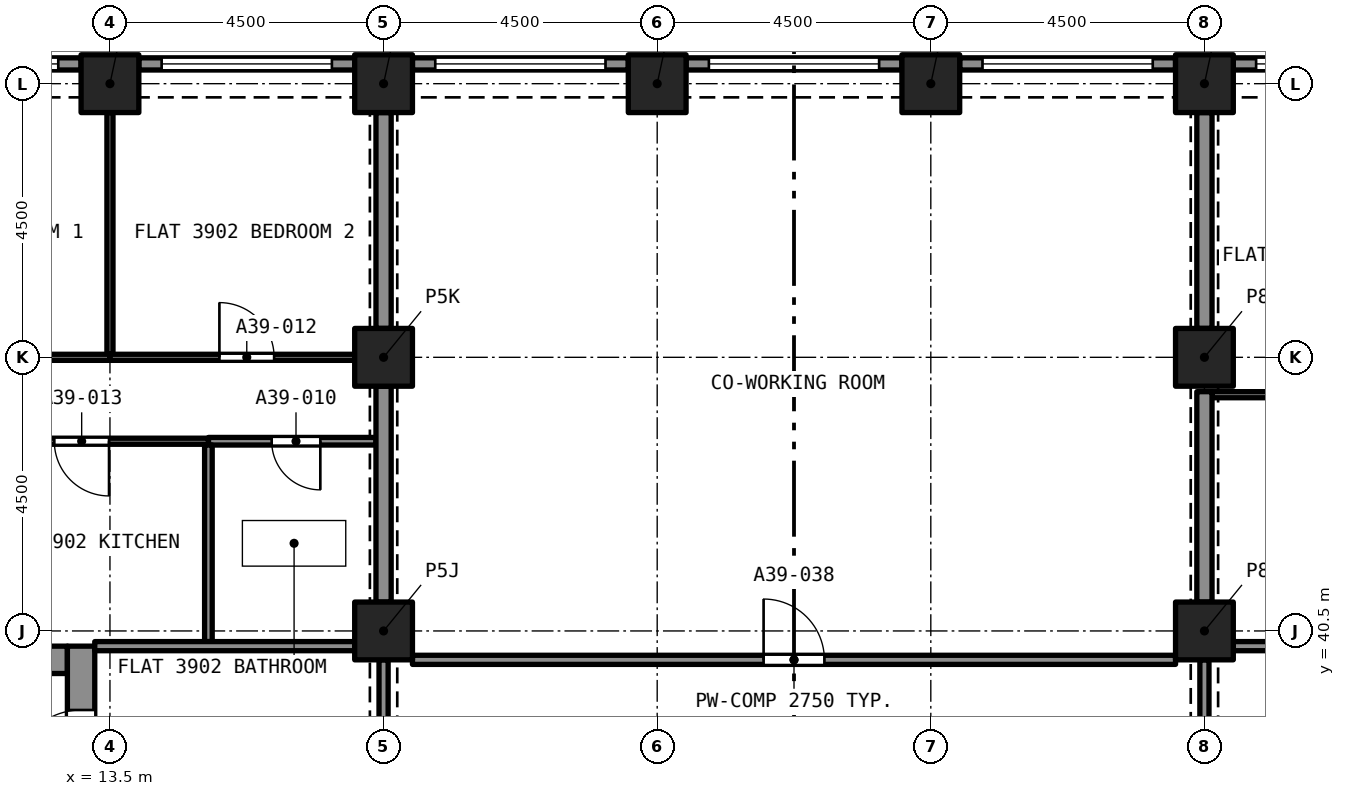
"""IFC4 building model, lengths in metres.
Left out: names, types, materials, properties, quantities, classifications, styles, units other than length and angle.
Written with IfcOpenShell. Run it as: python <this file> out.ifc"""

import sys

from ifc_helpers import new_model, si_unit, direction, frame, frame_2d, origin, origin_2d, place, context, subcontext, project, spatial, rectangle, extrude, element, fill, save


model = new_model("IFC4")
c1 = context("Model", 3, precision=1e-05, world=origin(), true_north=direction((0.0, 1.0)))
c2 = subcontext(c1, "Body", "Model", "MODEL_VIEW")
j1 = project(units=[si_unit("LENGTHUNIT", "METRE"), si_unit("PLANEANGLEUNIT", "RADIAN")], contexts=[c1])
p1 = place(None, origin())
s1 = spatial("IfcSite", under=j1, at=p1, CompositionType="ELEMENT")
p2 = place(p1, origin())
s2 = spatial("IfcBuilding", under=s1, at=p2, CompositionType="ELEMENT")
p3 = place(p2, frame((0.0, 0.0, 139.8)))
s3 = spatial("IfcBuildingStorey", under=s2, at=p3, CompositionType="ELEMENT", Elevation=139.8)
for number, where, z_axis, x_axis in (
    (1, (18.0, 40.5, 0.0), (0.0, 0.0, 1.0), (1.0, 0.0, 0.0)),
    (2, (31.5, 40.5, 0.0), (0.0, 0.0, 1.0), (1.0, 0.0, 0.0)),
    (3, (18.0, 45.0, 0.0), (0.0, 0.0, 1.0), (1.0, 0.0, 0.0)),
    (4, (31.5, 45.0, 0.0), (0.0, 0.0, 1.0), (1.0, 0.0, 0.0)),
    (5, (13.5, 49.5, 0.0), (0.0, 0.0, 1.0), (1.0, 0.0, 0.0)),
    (6, (18.0, 49.5, 0.0), (0.0, 0.0, 1.0), (1.0, 0.0, 0.0)),
    (7, (22.5, 49.5, 0.0), (0.0, 0.0, 1.0), (1.0, 0.0, 0.0)),
    (8, (27.0, 49.5, 0.0), (0.0, 0.0, 1.0), (1.0, 0.0, 0.0)),
    (9, (31.5, 49.5, 0.0), (0.0, 0.0, 1.0), (1.0, 0.0, 0.0)),
):
    element("IfcColumn", number, at=place(p3, frame(where, z_axis=z_axis, x_axis=x_axis)), inside=s3, PredefinedType="COLUMN", context=c2, shape_type="SweptSolid", body=[
        extrude(rectangle(XDim=0.95, YDim=0.95, at=origin_2d()), origin(), (0.0, 0.0, 1.0), 3.2),
    ])
p4 = place(p3, frame((5.2, 40.025, 0.0), z_axis=(0.0, 0.0, 1.0), x_axis=(1.0, 0.0, 0.0)))
e10 = element("IfcWall", 10, at=p4, inside=s3, PredefinedType="SOLIDWALL", context=c2, shape_type="SweptSolid", body=[
    extrude(rectangle(XDim=7.6, YDim=0.45, at=frame_2d((3.8, 0.0))), origin(), (0.0, 0.0, 1.0), 3.2),
])
p5 = place(p3, frame((13.025, 27.25, 0.0), z_axis=(0.0, 0.0, 1.0), x_axis=(0.0, 1.0, 0.0)))
e11 = element("IfcWall", 11, at=p5, inside=s3, PredefinedType="SOLIDWALL", context=c2, shape_type="SweptSolid", body=[
    extrude(rectangle(XDim=13.0, YDim=0.45, at=frame_2d((6.5, 0.0))), origin(), (0.0, 0.0, 1.0), 3.2),
])
p6 = place(p5, frame((10.85, 0.0, 0.0)))
e12 = element("IfcOpeningElement", 12, at=p6, cuts=e11, PredefinedType="OPENING", context=c2, shape_type="SweptSolid", body=[
    extrude(rectangle(XDim=1.1, YDim=2.1, at=frame_2d((0.55, 1.05))), frame((0.0, 0.235, 0.0), z_axis=(0.0, -1.0, 0.0), x_axis=(1.0, 0.0, 0.0)), (0.0, 0.0, 1.0), 0.47),
])
p7 = place(p5, frame((8.7, 0.0, 0.0)))
e13 = element("IfcOpeningElement", 13, at=p7, cuts=e11, PredefinedType="OPENING", context=c2, shape_type="SweptSolid", body=[
    extrude(rectangle(XDim=1.2, YDim=2.1, at=frame_2d((0.6, 1.05))), frame((0.0, 0.235, 0.0), z_axis=(0.0, -1.0, 0.0), x_axis=(1.0, 0.0, 0.0)), (0.0, 0.0, 1.0), 0.47),
])
p8 = place(p3, frame((31.975, 49.825, 0.0), z_axis=(0.0, 0.0, 1.0), x_axis=(1.0, 0.0, 0.0)))
e14 = element("IfcWall", 14, at=p8, inside=s3, PredefinedType="SOLIDWALL", context=c2, shape_type="SweptSolid", body=[
    extrude(rectangle(XDim=3.55, YDim=0.2, at=frame_2d((1.775, 0.0))), origin(), (0.0, 0.0, 1.0), 3.2),
])
p9 = place(p8, frame((0.375, 0.0, 0.45)))
e15 = element("IfcOpeningElement", 15, at=p9, cuts=e14, PredefinedType="OPENING", context=c2, shape_type="SweptSolid", body=[
    extrude(rectangle(XDim=2.8, YDim=1.95, at=frame_2d((1.4, 0.975))), frame((0.0, 0.11, 0.0), z_axis=(0.0, -1.0, 0.0), x_axis=(1.0, 0.0, 0.0)), (0.0, 0.0, 1.0), 0.22),
])
p10 = place(p3, frame((27.475, 49.825, 0.0), z_axis=(0.0, 0.0, 1.0), x_axis=(1.0, 0.0, 0.0)))
e16 = element("IfcWall", 16, at=p10, inside=s3, PredefinedType="SOLIDWALL", context=c2, shape_type="SweptSolid", body=[
    extrude(rectangle(XDim=3.55, YDim=0.2, at=frame_2d((1.775, 0.0))), origin(), (0.0, 0.0, 1.0), 3.2),
])
p11 = place(p10, frame((0.375, 0.0, 0.45)))
e17 = element("IfcOpeningElement", 17, at=p11, cuts=e16, PredefinedType="OPENING", context=c2, shape_type="SweptSolid", body=[
    extrude(rectangle(XDim=2.8, YDim=1.95, at=frame_2d((1.4, 0.975))), frame((0.0, 0.11, 0.0), z_axis=(0.0, -1.0, 0.0), x_axis=(1.0, 0.0, 0.0)), (0.0, 0.0, 1.0), 0.22),
])
p12 = place(p3, frame((22.975, 49.825, 0.0), z_axis=(0.0, 0.0, 1.0), x_axis=(1.0, 0.0, 0.0)))
e18 = element("IfcWall", 18, at=p12, inside=s3, PredefinedType="SOLIDWALL", context=c2, shape_type="SweptSolid", body=[
    extrude(rectangle(XDim=3.55, YDim=0.2, at=frame_2d((1.775, 0.0))), origin(), (0.0, 0.0, 1.0), 3.2),
])
p13 = place(p12, frame((0.375, 0.0, 0.45)))
e19 = element("IfcOpeningElement", 19, at=p13, cuts=e18, PredefinedType="OPENING", context=c2, shape_type="SweptSolid", body=[
    extrude(rectangle(XDim=2.8, YDim=1.95, at=frame_2d((1.4, 0.975))), frame((0.0, 0.11, 0.0), z_axis=(0.0, -1.0, 0.0), x_axis=(1.0, 0.0, 0.0)), (0.0, 0.0, 1.0), 0.22),
])
p14 = place(p3, frame((18.475, 49.825, 0.0), z_axis=(0.0, 0.0, 1.0), x_axis=(1.0, 0.0, 0.0)))
e20 = element("IfcWall", 20, at=p14, inside=s3, PredefinedType="SOLIDWALL", context=c2, shape_type="SweptSolid", body=[
    extrude(rectangle(XDim=3.55, YDim=0.2, at=frame_2d((1.775, 0.0))), origin(), (0.0, 0.0, 1.0), 3.2),
])
p15 = place(p14, frame((0.375, 0.0, 0.45)))
e21 = element("IfcOpeningElement", 21, at=p15, cuts=e20, PredefinedType="OPENING", context=c2, shape_type="SweptSolid", body=[
    extrude(rectangle(XDim=2.8, YDim=1.95, at=frame_2d((1.4, 0.975))), frame((0.0, 0.11, 0.0), z_axis=(0.0, -1.0, 0.0), x_axis=(1.0, 0.0, 0.0)), (0.0, 0.0, 1.0), 0.22),
])
p16 = place(p3, frame((13.975, 49.825, 0.0), z_axis=(0.0, 0.0, 1.0), x_axis=(1.0, 0.0, 0.0)))
e22 = element("IfcWall", 22, at=p16, inside=s3, PredefinedType="SOLIDWALL", context=c2, shape_type="SweptSolid", body=[
    extrude(rectangle(XDim=3.55, YDim=0.2, at=frame_2d((1.775, 0.0))), origin(), (0.0, 0.0, 1.0), 3.2),
])
p17 = place(p16, frame((0.375, 0.0, 0.45)))
e23 = element("IfcOpeningElement", 23, at=p17, cuts=e22, PredefinedType="OPENING", context=c2, shape_type="SweptSolid", body=[
    extrude(rectangle(XDim=2.8, YDim=1.95, at=frame_2d((1.4, 0.975))), frame((0.0, 0.11, 0.0), z_axis=(0.0, -1.0, 0.0), x_axis=(1.0, 0.0, 0.0)), (0.0, 0.0, 1.0), 0.22),
])
p18 = place(p3, frame((9.475, 49.825, 0.0), z_axis=(0.0, 0.0, 1.0), x_axis=(1.0, 0.0, 0.0)))
e24 = element("IfcWall", 24, at=p18, inside=s3, PredefinedType="SOLIDWALL", context=c2, shape_type="SweptSolid", body=[
    extrude(rectangle(XDim=3.55, YDim=0.2, at=frame_2d((1.775, 0.0))), origin(), (0.0, 0.0, 1.0), 3.2),
])
p19 = place(p18, frame((0.375, 0.0, 0.45)))
e25 = element("IfcOpeningElement", 25, at=p19, cuts=e24, PredefinedType="OPENING", context=c2, shape_type="SweptSolid", body=[
    extrude(rectangle(XDim=2.8, YDim=1.95, at=frame_2d((1.4, 0.975))), frame((0.0, 0.11, 0.0), z_axis=(0.0, -1.0, 0.0), x_axis=(1.0, 0.0, 0.0)), (0.0, 0.0, 1.0), 0.22),
])
p20 = place(p3, frame((17.875, 43.62, 0.0), z_axis=(0.0, 0.0, 1.0), x_axis=(-1.0, 0.0, 0.0)))
e26 = element("IfcWall", 26, at=p20, inside=s3, PredefinedType="PARTITIONING", context=c2, shape_type="SweptSolid", body=[
    extrude(rectangle(XDim=2.756, YDim=0.125, at=frame_2d((1.378, 0.0))), origin(), (0.0, 0.0, 1.0), 2.9),
])
p21 = place(p20, frame((0.915, 0.0, 0.0)))
e27 = element("IfcOpeningElement", 27, at=p21, cuts=e26, PredefinedType="OPENING", context=c2, shape_type="SweptSolid", body=[
    extrude(rectangle(XDim=0.8, YDim=2.1, at=frame_2d((0.4, 1.05))), frame((0.0, 0.073, 0.0), z_axis=(0.0, -1.0, 0.0), x_axis=(1.0, 0.0, 0.0)), (0.0, 0.0, 1.0), 0.145),
])
p22 = place(p3, frame((15.119, 40.325, 0.0), z_axis=(0.0, 0.0, 1.0), x_axis=(0.0, 1.0, 0.0)))
e28 = element("IfcWall", 28, at=p22, inside=s3, PredefinedType="PARTITIONING", context=c2, shape_type="SweptSolid", body=[
    extrude(rectangle(XDim=3.233, YDim=0.125, at=frame_2d((1.616, 0.0))), origin(), (0.0, 0.0, 1.0), 2.9),
])
p23 = place(p3, frame((18.0, 40.975, 0.0), z_axis=(0.0, 0.0, 1.0), x_axis=(0.0, 1.0, 0.0)))
e29 = element("IfcWall", 29, at=p23, inside=s3, PredefinedType="PARTITIONING", context=c2, shape_type="SweptSolid", body=[
    extrude(rectangle(XDim=3.55, YDim=0.25, at=frame_2d((1.775, 0.0))), origin(), (0.0, 0.0, 1.0), 2.38),
])
p24 = place(p3, frame((13.5, 45.05, 0.0), z_axis=(0.0, 0.0, 1.0), x_axis=(0.0, 1.0, 0.0)))
e30 = element("IfcWall", 30, at=p24, inside=s3, PredefinedType="PARTITIONING", context=c2, shape_type="SweptSolid", body=[
    extrude(rectangle(XDim=3.975, YDim=0.1, at=frame_2d((1.987, 0.0))), origin(), (0.0, 0.0, 1.0), 2.9),
])
p25 = place(p3, frame((9.0, 45.0, 0.0), z_axis=(0.0, 0.0, 1.0), x_axis=(1.0, 0.0, 0.0)))
e31 = element("IfcWall", 31, at=p25, inside=s3, PredefinedType="PARTITIONING", context=c2, shape_type="SweptSolid", body=[
    extrude(rectangle(XDim=4.5, YDim=0.1, at=frame_2d((2.25, 0.0))), origin(), (0.0, 0.0, 1.0), 2.9),
])
p26 = place(p25, frame((1.8, 0.0, 0.0)))
e32 = element("IfcOpeningElement", 32, at=p26, cuts=e31, PredefinedType="OPENING", context=c2, shape_type="SweptSolid", body=[
    extrude(rectangle(XDim=0.9, YDim=2.1, at=frame_2d((0.45, 1.05))), frame((0.0, 0.06, 0.0), z_axis=(0.0, -1.0, 0.0), x_axis=(1.0, 0.0, 0.0)), (0.0, 0.0, 1.0), 0.12),
])
p27 = place(p3, frame((13.5, 45.0, 0.0), z_axis=(0.0, 0.0, 1.0), x_axis=(1.0, 0.0, 0.0)))
e33 = element("IfcWall", 33, at=p27, inside=s3, PredefinedType="PARTITIONING", context=c2, shape_type="SweptSolid", body=[
    extrude(rectangle(XDim=4.025, YDim=0.1, at=frame_2d((2.012, 0.0))), origin(), (0.0, 0.0, 1.0), 2.9),
])
p28 = place(p27, frame((1.8, 0.0, 0.0)))
e34 = element("IfcOpeningElement", 34, at=p28, cuts=e33, PredefinedType="OPENING", context=c2, shape_type="SweptSolid", body=[
    extrude(rectangle(XDim=0.9, YDim=2.1, at=frame_2d((0.45, 1.05))), frame((0.0, 0.06, 0.0), z_axis=(0.0, -1.0, 0.0), x_axis=(1.0, 0.0, 0.0)), (0.0, 0.0, 1.0), 0.12),
])
p29 = place(p3, frame((18.0, 45.475, 0.0), z_axis=(0.0, 0.0, 1.0), x_axis=(0.0, 1.0, 0.0)))
e35 = element("IfcWall", 35, at=p29, inside=s3, PredefinedType="PARTITIONING", context=c2, shape_type="SweptSolid", body=[
    extrude(rectangle(XDim=3.55, YDim=0.25, at=frame_2d((1.775, 0.0))), origin(), (0.0, 0.0, 1.0), 2.38),
])
p30 = place(p3, frame((15.119, 43.62, 0.0), z_axis=(0.0, 0.0, 1.0), x_axis=(-1.0, 0.0, 0.0)))
e36 = element("IfcWall", 36, at=p30, inside=s3, PredefinedType="PARTITIONING", context=c2, shape_type="SweptSolid", body=[
    extrude(rectangle(XDim=4.219, YDim=0.1, at=frame_2d((2.11, 0.0))), origin(), (0.0, 0.0, 1.0), 2.9),
])
p31 = place(p30, frame((1.635, 0.0, 0.0)))
e37 = element("IfcOpeningElement", 37, at=p31, cuts=e36, PredefinedType="OPENING", context=c2, shape_type="SweptSolid", body=[
    extrude(rectangle(XDim=0.9, YDim=2.1, at=frame_2d((0.45, 1.05))), frame((0.0, 0.06, 0.0), z_axis=(0.0, -1.0, 0.0), x_axis=(1.0, 0.0, 0.0)), (0.0, 0.0, 1.0), 0.12),
])
p32 = place(p3, frame((13.25, 40.25, 0.0), z_axis=(0.0, 0.0, 1.0), x_axis=(1.0, 0.0, 0.0)))
e38 = element("IfcWall", 38, at=p32, inside=s3, PredefinedType="PARTITIONING", context=c2, shape_type="SweptSolid", body=[
    extrude(rectangle(XDim=4.275, YDim=0.15, at=frame_2d((2.137, 0.0))), origin(), (0.0, 0.0, 1.0), 2.9),
])
p33 = place(p3, frame((31.625, 44.385, 0.0), z_axis=(0.0, 0.0, 1.0), x_axis=(1.0, 0.0, 0.0)))
e39 = element("IfcWall", 39, at=p33, inside=s3, PredefinedType="PARTITIONING", context=c2, shape_type="SweptSolid", body=[
    extrude(rectangle(XDim=4.375, YDim=0.1, at=frame_2d((2.188, 0.0))), origin(), (0.0, 0.0, 1.0), 2.9),
])
p34 = place(p33, frame((1.625, 0.0, 0.0)))
e40 = element("IfcOpeningElement", 40, at=p34, cuts=e39, PredefinedType="OPENING", context=c2, shape_type="SweptSolid", body=[
    extrude(rectangle(XDim=1.0, YDim=2.1, at=frame_2d((0.5, 1.05))), frame((0.0, 0.06, 0.0), z_axis=(0.0, -1.0, 0.0), x_axis=(1.0, 0.0, 0.0)), (0.0, 0.0, 1.0), 0.12),
])
p35 = place(p3, frame((31.5, 40.975, 0.0), z_axis=(0.0, 0.0, 1.0), x_axis=(0.0, 1.0, 0.0)))
e41 = element("IfcWall", 41, at=p35, inside=s3, PredefinedType="PARTITIONING", context=c2, shape_type="SweptSolid", body=[
    extrude(rectangle(XDim=3.46, YDim=0.25, at=frame_2d((1.73, 0.0))), origin(), (0.0, 0.0, 1.0), 2.38),
])
p36 = place(p3, frame((31.975, 40.25, 0.0), z_axis=(0.0, 0.0, 1.0), x_axis=(1.0, 0.0, 0.0)))
e42 = element("IfcWall", 42, at=p36, inside=s3, PredefinedType="PARTITIONING", context=c2, shape_type="SweptSolid", body=[
    extrude(rectangle(XDim=2.375, YDim=0.15, at=frame_2d((1.188, 0.0))), origin(), (0.0, 0.0, 1.0), 2.9),
])
p37 = place(p36, frame((1.245, 0.0, 0.0)))
e43 = element("IfcOpeningElement", 43, at=p37, cuts=e42, PredefinedType="OPENING", context=c2, shape_type="SweptSolid", body=[
    extrude(rectangle(XDim=1.0, YDim=2.1, at=frame_2d((0.5, 1.05))), frame((0.0, 0.085, 0.0), z_axis=(0.0, -1.0, 0.0), x_axis=(1.0, 0.0, 0.0)), (0.0, 0.0, 1.0), 0.17),
])
p38 = place(p3, frame((31.5, 45.475, 0.0), z_axis=(0.0, 0.0, 1.0), x_axis=(0.0, 1.0, 0.0)))
e44 = element("IfcWall", 44, at=p38, inside=s3, PredefinedType="PARTITIONING", context=c2, shape_type="SweptSolid", body=[
    extrude(rectangle(XDim=3.55, YDim=0.25, at=frame_2d((1.775, 0.0))), origin(), (0.0, 0.0, 1.0), 2.38),
])
p39 = place(p3, frame((18.475, 40.025, 0.0), z_axis=(0.0, 0.0, 1.0), x_axis=(1.0, 0.0, 0.0)))
e45 = element("IfcWall", 45, at=p39, inside=s3, PredefinedType="PARTITIONING", context=c2, shape_type="SweptSolid", body=[
    extrude(rectangle(XDim=12.55, YDim=0.15, at=frame_2d((6.275, 0.0))), origin(), (0.0, 0.0, 1.0), 2.75),
])
p40 = place(p39, frame((5.775, 0.0, 0.0)))
e46 = element("IfcOpeningElement", 46, at=p40, cuts=e45, PredefinedType="OPENING", context=c2, shape_type="SweptSolid", body=[
    extrude(rectangle(XDim=1.0, YDim=2.1, at=frame_2d((0.5, 1.05))), frame((0.0, 0.085, 0.0), z_axis=(0.0, -1.0, 0.0), x_axis=(1.0, 0.0, 0.0)), (0.0, 0.0, 1.0), 0.17),
])
p41 = place(p3, frame((31.5, 36.475, 0.0), z_axis=(0.0, 0.0, 1.0), x_axis=(0.0, 1.0, 0.0)))
e47 = element("IfcWall", 47, at=p41, inside=s3, PredefinedType="PARTITIONING", context=c2, shape_type="SweptSolid", body=[
    extrude(rectangle(XDim=3.55, YDim=0.15, at=frame_2d((1.775, 0.0))), origin(), (0.0, 0.0, 1.0), 2.38),
])
p42 = place(p41, frame((1.175, 0.0, 0.0)))
e48 = element("IfcOpeningElement", 48, at=p42, cuts=e47, PredefinedType="OPENING", context=c2, shape_type="SweptSolid", body=[
    extrude(rectangle(XDim=1.2, YDim=2.1, at=frame_2d((0.6, 1.05))), frame((0.0, 0.085, 0.0), z_axis=(0.0, -1.0, 0.0), x_axis=(1.0, 0.0, 0.0)), (0.0, 0.0, 1.0), 0.17),
])
p43 = place(p3, frame((18.0, 40.025, 0.0), z_axis=(0.0, 0.0, 1.0), x_axis=(0.0, -1.0, 0.0)))
e49 = element("IfcWall", 49, at=p43, inside=s3, PredefinedType="PARTITIONING", context=c2, shape_type="SweptSolid", body=[
    extrude(rectangle(XDim=3.55, YDim=0.15, at=frame_2d((1.775, 0.0))), origin(), (0.0, 0.0, 1.0), 2.38),
])
p44 = place(p43, frame((1.175, 0.0, 0.0)))
e50 = element("IfcOpeningElement", 50, at=p44, cuts=e49, PredefinedType="OPENING", context=c2, shape_type="SweptSolid", body=[
    extrude(rectangle(XDim=1.2, YDim=2.1, at=frame_2d((0.6, 1.05))), frame((0.0, 0.085, 0.0), z_axis=(0.0, -1.0, 0.0), x_axis=(1.0, 0.0, 0.0)), (0.0, 0.0, 1.0), 0.17),
])
p45 = place(p9, origin())
e51 = element("IfcWindow", 51, at=p45, inside=s3, PartitioningType="SINGLE_PANEL", PredefinedType="WINDOW", context=c2, shape_type="SweptSolid", body=[
    extrude(rectangle(XDim=2.8, YDim=1.95, at=frame_2d((1.4, 0.975))), frame((0.0, 0.03, 0.0), z_axis=(0.0, -1.0, 0.0), x_axis=(1.0, 0.0, 0.0)), (0.0, 0.0, 1.0), 0.06),
])
fill(e15, e51)
p46 = place(p11, origin())
e52 = element("IfcWindow", 52, at=p46, inside=s3, PartitioningType="SINGLE_PANEL", PredefinedType="WINDOW", context=c2, shape_type="SweptSolid", body=[
    extrude(rectangle(XDim=2.8, YDim=1.95, at=frame_2d((1.4, 0.975))), frame((0.0, 0.03, 0.0), z_axis=(0.0, -1.0, 0.0), x_axis=(1.0, 0.0, 0.0)), (0.0, 0.0, 1.0), 0.06),
])
fill(e17, e52)
p47 = place(p13, origin())
e53 = element("IfcWindow", 53, at=p47, inside=s3, PartitioningType="SINGLE_PANEL", PredefinedType="WINDOW", context=c2, shape_type="SweptSolid", body=[
    extrude(rectangle(XDim=2.8, YDim=1.95, at=frame_2d((1.4, 0.975))), frame((0.0, 0.03, 0.0), z_axis=(0.0, -1.0, 0.0), x_axis=(1.0, 0.0, 0.0)), (0.0, 0.0, 1.0), 0.06),
])
fill(e19, e53)
p48 = place(p15, origin())
e54 = element("IfcWindow", 54, at=p48, inside=s3, PartitioningType="SINGLE_PANEL", PredefinedType="WINDOW", context=c2, shape_type="SweptSolid", body=[
    extrude(rectangle(XDim=2.8, YDim=1.95, at=frame_2d((1.4, 0.975))), frame((0.0, 0.03, 0.0), z_axis=(0.0, -1.0, 0.0), x_axis=(1.0, 0.0, 0.0)), (0.0, 0.0, 1.0), 0.06),
])
fill(e21, e54)
p49 = place(p17, origin())
e55 = element("IfcWindow", 55, at=p49, inside=s3, PartitioningType="SINGLE_PANEL", PredefinedType="WINDOW", context=c2, shape_type="SweptSolid", body=[
    extrude(rectangle(XDim=2.8, YDim=1.95, at=frame_2d((1.4, 0.975))), frame((0.0, 0.03, 0.0), z_axis=(0.0, -1.0, 0.0), x_axis=(1.0, 0.0, 0.0)), (0.0, 0.0, 1.0), 0.06),
])
fill(e23, e55)
p50 = place(p19, origin())
e56 = element("IfcWindow", 56, at=p50, inside=s3, PartitioningType="SINGLE_PANEL", PredefinedType="WINDOW", context=c2, shape_type="SweptSolid", body=[
    extrude(rectangle(XDim=2.8, YDim=1.95, at=frame_2d((1.4, 0.975))), frame((0.0, 0.03, 0.0), z_axis=(0.0, -1.0, 0.0), x_axis=(1.0, 0.0, 0.0)), (0.0, 0.0, 1.0), 0.06),
])
fill(e25, e56)
p51 = place(p21, origin())
e57 = element("IfcDoor", 57, at=p51, inside=s3, OperationType="SINGLE_SWING_LEFT", PredefinedType="DOOR", context=c2, shape_type="SweptSolid", body=[
    extrude(rectangle(XDim=0.8, YDim=2.1, at=frame_2d((0.4, 1.05))), frame((0.0, 0.025, 0.0), z_axis=(0.0, -1.0, 0.0), x_axis=(1.0, 0.0, 0.0)), (0.0, 0.0, 1.0), 0.05),
])
fill(e27, e57)
p52 = place(p28, origin())
e58 = element("IfcDoor", 58, at=p52, inside=s3, OperationType="SINGLE_SWING_RIGHT", PredefinedType="DOOR", context=c2, shape_type="SweptSolid", body=[
    extrude(rectangle(XDim=0.9, YDim=2.1, at=frame_2d((0.45, 1.05))), frame((0.0, 0.025, 0.0), z_axis=(0.0, -1.0, 0.0), x_axis=(1.0, 0.0, 0.0)), (0.0, 0.0, 1.0), 0.05),
])
fill(e34, e58)
p53 = place(p31, origin())
e59 = element("IfcDoor", 59, at=p53, inside=s3, OperationType="SINGLE_SWING_LEFT", PredefinedType="DOOR", context=c2, shape_type="SweptSolid", body=[
    extrude(rectangle(XDim=0.9, YDim=2.1, at=frame_2d((0.45, 1.05))), frame((0.0, 0.025, 0.0), z_axis=(0.0, -1.0, 0.0), x_axis=(1.0, 0.0, 0.0)), (0.0, 0.0, 1.0), 0.05),
])
fill(e37, e59)
p54 = place(p40, origin())
e60 = element("IfcDoor", 60, at=p54, inside=s3, OperationType="SINGLE_SWING_RIGHT", PredefinedType="DOOR", context=c2, shape_type="SweptSolid", body=[
    extrude(rectangle(XDim=1.0, YDim=2.1, at=frame_2d((0.5, 1.05))), frame((0.0, 0.025, 0.0), z_axis=(0.0, -1.0, 0.0), x_axis=(1.0, 0.0, 0.0)), (0.0, 0.0, 1.0), 0.05),
])
fill(e46, e60)
p55 = place(p6, origin())
e61 = element("IfcDoor", 61, at=p55, inside=s3, OperationType="SINGLE_SWING_LEFT", PredefinedType="DOOR", context=c2, shape_type="SweptSolid", body=[
    extrude(rectangle(XDim=1.1, YDim=2.1, at=frame_2d((0.55, 1.05))), frame((0.0, 0.025, 0.0), z_axis=(0.0, -1.0, 0.0), x_axis=(1.0, 0.0, 0.0)), (0.0, 0.0, 1.0), 0.05),
])
fill(e12, e61)
save(model, sys.argv[1])
